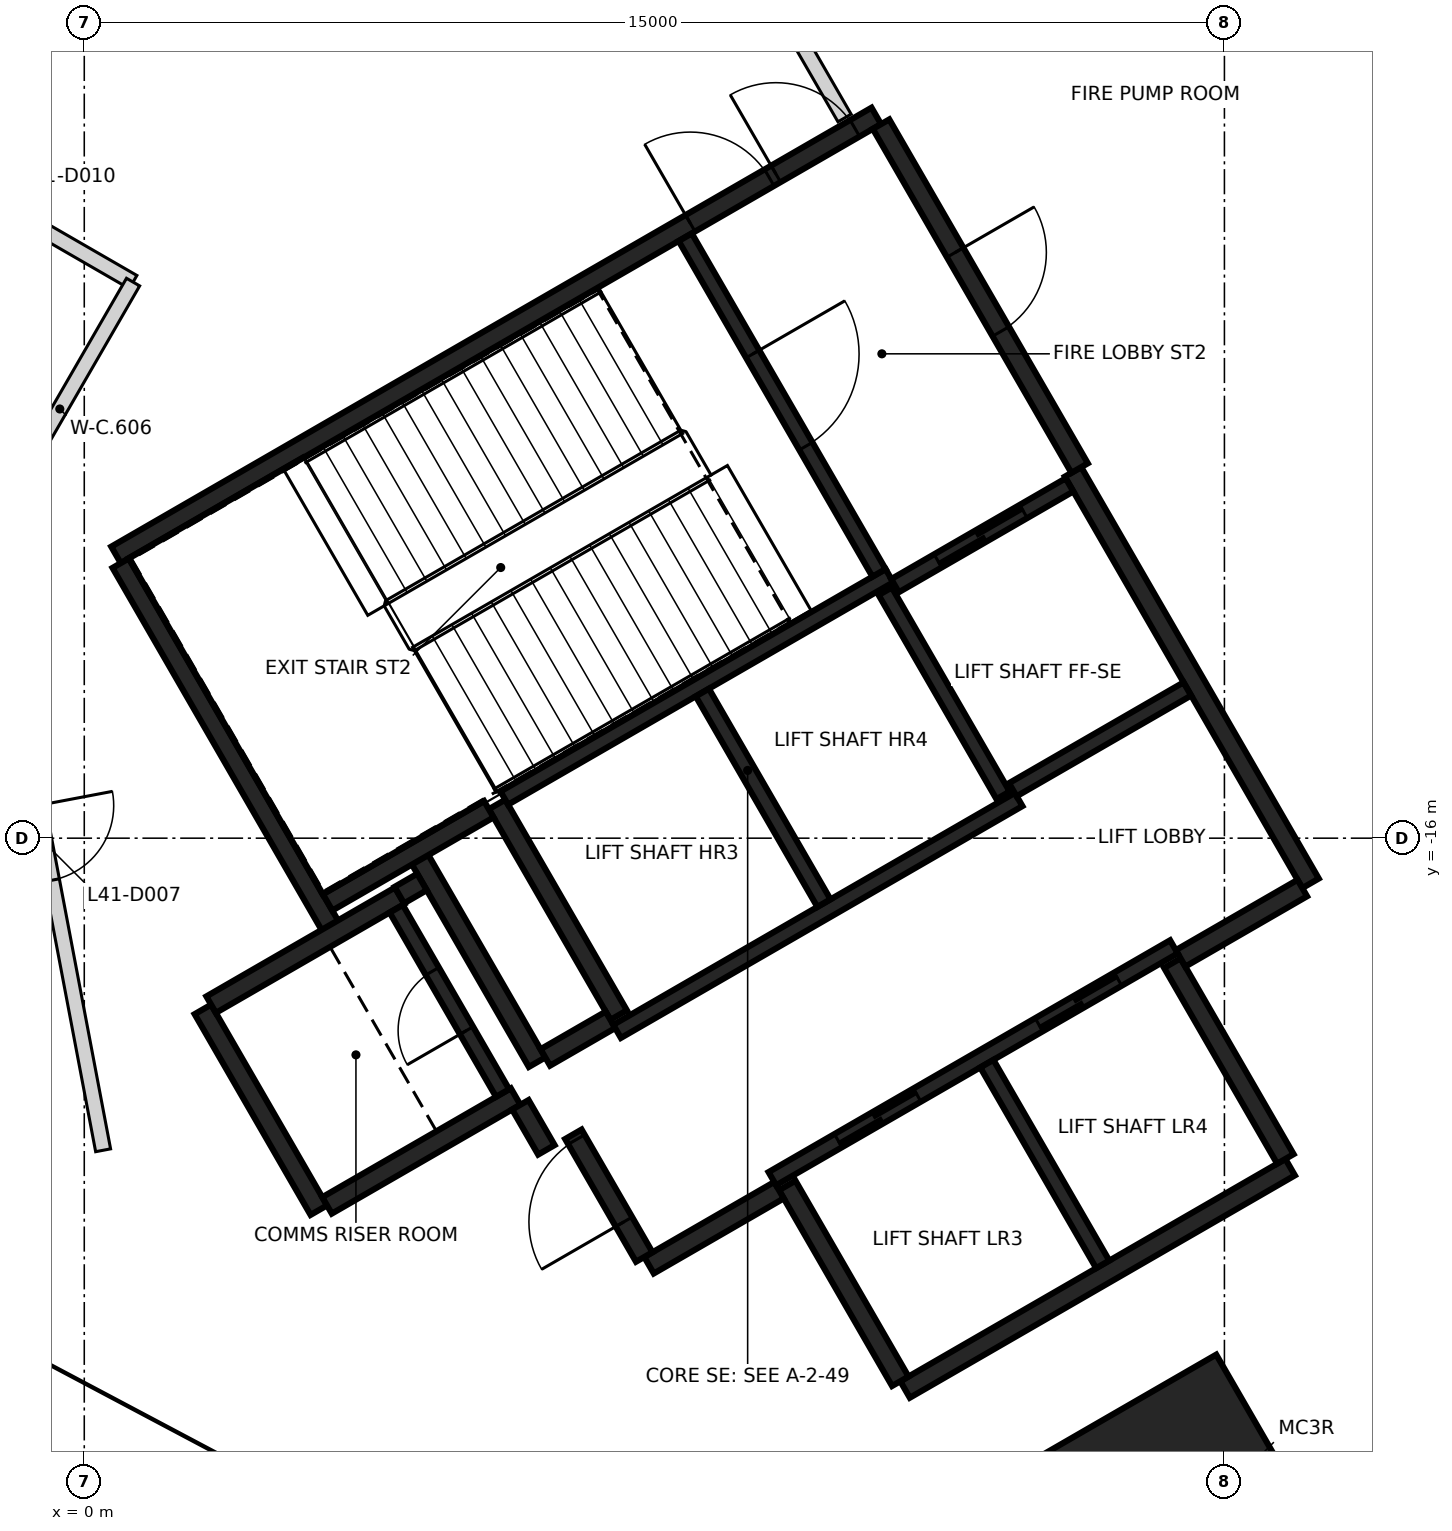
"""IFC4 building model, lengths in metres.
Left out: names, types, materials, properties, quantities, classifications, styles, units other than length and angle.
Written with IfcOpenShell. Run it as: python <this file> out.ifc"""

import sys

from ifc_helpers import new_model, si_unit, direction, frame, frame_2d, origin, origin_2d, place, context, subcontext, project, spatial, rectangle, extrude, element, fill, save


model = new_model("IFC4")
c1 = context("Model", 3, precision=1e-05, world=origin(), true_north=direction((0.0, 1.0)))
c2 = subcontext(c1, "Body", "Model", "MODEL_VIEW")
j1 = project(units=[si_unit("LENGTHUNIT", "METRE"), si_unit("PLANEANGLEUNIT", "RADIAN")], contexts=[c1])
p1 = place(None, origin())
s1 = spatial("IfcSite", under=j1, at=p1, CompositionType="ELEMENT")
p2 = place(p1, origin())
s2 = spatial("IfcBuilding", under=s1, at=p2, CompositionType="ELEMENT")
p3 = place(p2, frame((0.0, 0.0, 164.8)))
s3 = spatial("IfcBuildingStorey", under=s2, at=p3, CompositionType="ELEMENT", Elevation=164.8)
p4 = place(p3, frame((14.493, -25.103, -0.4), z_axis=(0.0, 0.0, 1.0), x_axis=(-0.5, 0.866025403784, 0.0)))
e1 = element("IfcColumn", 1, at=p4, inside=s3, PredefinedType="COLUMN", context=c2, shape_type="SweptSolid", body=[
    extrude(rectangle(XDim=3.6, YDim=3.0, at=origin_2d()), origin(), (0.0, 0.0, 1.0), 4.85),
])
p5 = place(p3, frame((0.417, -12.273, 0.0), z_axis=(0.0, 0.0, 1.0), x_axis=(0.866021906294, 0.500006057782, 0.0)))
e2 = element("IfcWall", 2, at=p5, inside=s3, PredefinedType="SHEAR", context=c2, shape_type="SweptSolid", body=[
    extrude(rectangle(XDim=11.55, YDim=0.25, at=frame_2d((5.775, 0.0))), origin(), (0.0, 0.0, 1.0), 4.45),
])
p6 = place(p5, frame((10.025, 0.0, 0.0)))
e3 = element("IfcOpeningElement", 3, at=p6, cuts=e2, PredefinedType="OPENING", context=c2, shape_type="SweptSolid", body=[
    extrude(rectangle(XDim=1.2, YDim=2.1, at=frame_2d((0.6, 1.05))), frame((0.0, 0.135, 0.0), z_axis=(0.0, -1.0, 0.0), x_axis=(1.0, 0.0, 0.0)), (0.0, 0.0, 1.0), 0.27),
])
p7 = place(p5, frame((8.725, 0.0, 0.0)))
e4 = element("IfcOpeningElement", 4, at=p7, cuts=e2, PredefinedType="OPENING", context=c2, shape_type="SweptSolid", body=[
    extrude(rectangle(XDim=1.2, YDim=2.1, at=frame_2d((0.6, 1.05))), frame((0.0, 0.135, 0.0), z_axis=(0.0, -1.0, 0.0), x_axis=(1.0, 0.0, 0.0)), (0.0, 0.0, 1.0), 0.27),
])
p8 = place(p3, frame((13.008, -11.181, 0.0), z_axis=(0.0, 0.0, 1.0), x_axis=(0.500004234368, -0.866022959057, 0.0)))
e5 = element("IfcWall", 5, at=p8, inside=s3, PredefinedType="SHEAR", context=c2, shape_type="SweptSolid", body=[
    extrude(rectangle(XDim=6.25, YDim=0.25, at=frame_2d((3.125, 0.0))), origin(), (0.0, 0.0, 1.0), 4.45),
])
p9 = place(p3, frame((15.865, -20.328, 0.0), z_axis=(0.0, 0.0, 1.0), x_axis=(-0.86602852612, -0.499994591916, 0.0)))
e6 = element("IfcWall", 6, at=p9, inside=s3, PredefinedType="SHEAR", context=c2, shape_type="SweptSolid", body=[
    extrude(rectangle(XDim=5.85, YDim=0.25, at=frame_2d((2.925, 0.0))), origin(), (0.0, 0.0, 1.0), 4.45),
])
p10 = place(p3, frame((3.235, -17.153, 0.0), z_axis=(0.0, 0.0, 1.0), x_axis=(-0.500008851346, 0.866020293397, 0.0)))
e7 = element("IfcWall", 7, at=p10, inside=s3, PredefinedType="SHEAR", context=c2, shape_type="SweptSolid", body=[
    extrude(rectangle(XDim=5.51, YDim=0.25, at=frame_2d((2.755, 0.0))), origin(), (0.0, 0.0, 1.0), 4.45),
])
p11 = place(p3, frame((10.483, -6.606, 0.0), z_axis=(0.0, 0.0, 1.0), x_axis=(0.49999885962, -0.866026062182, 0.0)))
e8 = element("IfcWall", 8, at=p11, inside=s3, PredefinedType="SHEAR", context=c2, shape_type="SweptSolid", body=[
    extrude(rectangle(XDim=5.225, YDim=0.25, at=frame_2d((2.612, 0.0))), origin(), (0.0, 0.0, 1.0), 4.45),
])
p12 = place(p11, frame((1.95, 0.0, 0.0)))
e9 = element("IfcOpeningElement", 9, at=p12, cuts=e8, PredefinedType="OPENING", context=c2, shape_type="SweptSolid", body=[
    extrude(rectangle(XDim=1.2, YDim=2.1, at=frame_2d((0.6, 1.05))), frame((0.0, 0.135, 0.0), z_axis=(0.0, -1.0, 0.0), x_axis=(1.0, 0.0, 0.0)), (0.0, 0.0, 1.0), 0.27),
])
p13 = place(p3, frame((7.031, -18.327, 0.0), z_axis=(0.0, 0.0, 1.0), x_axis=(-0.499971222258, 0.866042017984, 0.0)))
e10 = element("IfcWall", 10, at=p13, inside=s3, PredefinedType="SHEAR", context=c2, shape_type="SweptSolid", body=[
    extrude(rectangle(XDim=3.2, YDim=0.25, at=frame_2d((1.6, 0.0))), origin(), (0.0, 0.0, 1.0), 4.45),
])
for number, where, z_axis, x_axis in (
    (11, (14.315, -17.644, 0.0), (0.0, 0.0, 1.0), (0.5, -0.866, 0.0)),
    (12, (10.736, -23.145, 0.0), (0.0, 0.0, 1.0), (-0.5, 0.866, 0.0)),
):
    element("IfcWall", number, at=place(p3, frame(where, z_axis=z_axis, x_axis=x_axis)), inside=s3, PredefinedType="SHEAR", context=c2, shape_type="SweptSolid", body=[
        extrude(rectangle(XDim=2.974, YDim=0.25, at=frame_2d((1.487, 0.0))), origin(), (0.0, 0.0, 1.0), 4.45),
    ])
p14 = place(p3, frame((3.085, -20.894, 0.0), z_axis=(0.0, 0.0, 1.0), x_axis=(-0.499978833458, 0.866037623948, 0.0)))
e13 = element("IfcWall", 13, at=p14, inside=s3, PredefinedType="SHEAR", context=c2, shape_type="SweptSolid", body=[
    extrude(rectangle(XDim=3.05, YDim=0.25, at=frame_2d((1.525, 0.0))), origin(), (0.0, 0.0, 1.0), 4.45),
])
p15 = place(p3, frame((1.669, -18.19, 0.0), z_axis=(0.0, 0.0, 1.0), x_axis=(0.866042235819, 0.499970844928, 0.0)))
e14 = element("IfcWall", 14, at=p15, inside=s3, PredefinedType="SHEAR", context=c2, shape_type="SweptSolid", body=[
    extrude(rectangle(XDim=2.865, YDim=0.25, at=frame_2d((1.432, 0.0))), origin(), (0.0, 0.0, 1.0), 4.45),
])
p16 = place(p3, frame((5.675, -19.399, 0.0), z_axis=(0.0, 0.0, 1.0), x_axis=(-0.866026637627, -0.499997862916, 0.0)))
e15 = element("IfcWall", 15, at=p16, inside=s3, PredefinedType="SHEAR", context=c2, shape_type="SweptSolid", body=[
    extrude(rectangle(XDim=2.865, YDim=0.25, at=frame_2d((1.432, 0.0))), origin(), (0.0, 0.0, 1.0), 4.45),
])
p17 = place(p3, frame((4.414, -16.276, 0.0), z_axis=(0.0, 0.0, 1.0), x_axis=(0.500003324108, -0.866023484601, 0.0)))
e16 = element("IfcWall", 16, at=p17, inside=s3, PredefinedType="SHEAR", context=c2, shape_type="SweptSolid", body=[
    extrude(rectangle(XDim=3.085, YDim=0.25, at=frame_2d((1.542, 0.0))), origin(), (0.0, 0.0, 1.0), 4.45),
])
p18 = place(p3, frame((5.322, -15.619, 0.0), z_axis=(0.0, 0.0, 1.0), x_axis=(-0.866026229868, -0.499998569178, 0.0)))
e17 = element("IfcWall", 17, at=p18, inside=s3, PredefinedType="SHEAR", context=c2, shape_type="SweptSolid", body=[
    extrude(rectangle(XDim=2.449, YDim=0.25, at=frame_2d((1.225, 0.0))), origin(), (0.0, 0.0, 1.0), 4.45),
])
p19 = place(p3, frame((9.14, -20.631, 0.0), z_axis=(0.0, 0.0, 1.0), x_axis=(-0.866043531843, -0.499968599967, 0.0)))
e18 = element("IfcWall", 18, at=p19, inside=s3, PredefinedType="SHEAR", context=c2, shape_type="SweptSolid", body=[
    extrude(rectangle(XDim=1.975, YDim=0.25, at=frame_2d((0.987, 0.0))), origin(), (0.0, 0.0, 1.0), 4.45),
])
p20 = place(p3, frame((16.025, -16.656, 0.0), z_axis=(0.0, 0.0, 1.0), x_axis=(-0.866016279763, -0.500015802937, 0.0)))
e19 = element("IfcWall", 19, at=p20, inside=s3, PredefinedType="SHEAR", context=c2, shape_type="SweptSolid", body=[
    extrude(rectangle(XDim=1.849, YDim=0.25, at=frame_2d((0.925, 0.0))), origin(), (0.0, 0.0, 1.0), 4.45),
])
p21 = place(p3, frame((7.367, -21.51, 0.0), z_axis=(0.0, 0.0, 1.0), x_axis=(-0.499983108224, 0.866035156036, 0.0)))
e20 = element("IfcWall", 20, at=p21, inside=s3, PredefinedType="SHEAR", context=c2, shape_type="SweptSolid", body=[
    extrude(rectangle(XDim=1.865, YDim=0.25, at=frame_2d((0.932, 0.0))), origin(), (0.0, 0.0, 1.0), 4.45),
])
p22 = place(p21, frame((0.535, 0.0, 0.0)))
e21 = element("IfcOpeningElement", 21, at=p22, cuts=e20, PredefinedType="OPENING", context=c2, shape_type="SweptSolid", body=[
    extrude(rectangle(XDim=1.25, YDim=2.1, at=frame_2d((0.625, 1.05))), frame((0.0, 0.135, 0.0), z_axis=(0.0, -1.0, 0.0), x_axis=(1.0, 0.0, 0.0)), (0.0, 0.0, 1.0), 0.27),
])
p23 = place(p3, frame((6.065, -18.885, 0.0), z_axis=(0.0, 0.0, 1.0), x_axis=(0.866017078145, 0.500014420154, 0.0)))
e22 = element("IfcWall", 22, at=p23, inside=s3, PredefinedType="SHEAR", context=c2, shape_type="SweptSolid", body=[
    extrude(rectangle(XDim=0.989, YDim=0.25, at=frame_2d((0.495, 0.0))), origin(), (0.0, 0.0, 1.0), 4.45),
])
p24 = place(p3, frame((6.08, -20.1, 0.0), z_axis=(0.0, 0.0, 1.0), x_axis=(-0.500051773299, 0.865995510393, 0.0)))
e23 = element("IfcWall", 23, at=p24, inside=s3, PredefinedType="SHEAR", context=c2, shape_type="SweptSolid", body=[
    extrude(rectangle(XDim=0.685, YDim=0.25, at=frame_2d((0.342, 0.0))), origin(), (0.0, 0.0, 1.0), 4.45),
])
p25 = place(p3, frame((4.145, -16.749, 0.0), z_axis=(0.0, 0.0, 1.0), x_axis=(0.866185586049, 0.49972245349, 0.0)))
e24 = element("IfcWall", 24, at=p25, inside=s3, PredefinedType="SHEAR", context=c2, shape_type="SweptSolid", body=[
    extrude(rectangle(XDim=0.344, YDim=0.25, at=frame_2d((0.172, 0.0))), origin(), (0.0, 0.0, 1.0), 4.45),
])
p26 = place(p3, frame((9.052, -20.48, 0.0), z_axis=(0.0, 0.0, 1.0), x_axis=(0.866030299012, 0.499991521122, 0.0)))
e25 = element("IfcWall", 25, at=p26, inside=s3, PredefinedType="SHEAR", context=c2, shape_type="SweptSolid", body=[
    extrude(rectangle(XDim=6.1, YDim=0.2, at=frame_2d((3.05, 0.0))), origin(), (0.0, 0.0, 1.0), 4.45),
])
p27 = place(p26, frame((1.0, 0.0, 0.0)))
e26 = element("IfcOpeningElement", 26, at=p27, cuts=e25, PredefinedType="OPENING", context=c2, shape_type="SweptSolid", body=[
    extrude(rectangle(XDim=1.2, YDim=2.1, at=frame_2d((0.6, 1.05))), frame((0.0, 0.11, 0.0), z_axis=(0.0, -1.0, 0.0), x_axis=(1.0, 0.0, 0.0)), (0.0, 0.0, 1.0), 0.22),
])
p28 = place(p26, frame((4.05, 0.0, 0.0)))
e27 = element("IfcOpeningElement", 27, at=p28, cuts=e25, PredefinedType="OPENING", context=c2, shape_type="SweptSolid", body=[
    extrude(rectangle(XDim=1.2, YDim=2.1, at=frame_2d((0.6, 1.05))), frame((0.0, 0.11, 0.0), z_axis=(0.0, -1.0, 0.0), x_axis=(1.0, 0.0, 0.0)), (0.0, 0.0, 1.0), 0.22),
])
p29 = place(p3, frame((5.526, -15.472, 0.0), z_axis=(0.0, 0.0, 1.0), x_axis=(0.866041752167, 0.499971682701, 0.0)))
e28 = element("IfcWall", 28, at=p29, inside=s3, PredefinedType="SHEAR", context=c2, shape_type="SweptSolid", body=[
    extrude(rectangle(XDim=5.851, YDim=0.2, at=frame_2d((2.925, 0.0))), origin(), (0.0, 0.0, 1.0), 4.45),
])
p30 = place(p3, frame((12.293, -15.491, 0.0), z_axis=(0.0, 0.0, 1.0), x_axis=(-0.866030299012, -0.499991521122, 0.0)))
e29 = element("IfcWall", 29, at=p30, inside=s3, PredefinedType="SHEAR", context=c2, shape_type="SweptSolid", body=[
    extrude(rectangle(XDim=6.1, YDim=0.2, at=frame_2d((3.05, 0.0))), origin(), (0.0, 0.0, 1.0), 4.45),
])
p31 = place(p3, frame((7.906, -8.094, 0.0), z_axis=(0.0, 0.0, 1.0), x_axis=(0.500027839223, -0.866009330205, 0.0)))
e30 = element("IfcWall", 30, at=p31, inside=s3, PredefinedType="SHEAR", context=c2, shape_type="SweptSolid", body=[
    extrude(rectangle(XDim=5.098, YDim=0.2, at=frame_2d((2.549, 0.0))), origin(), (0.0, 0.0, 1.0), 4.45),
])
p32 = place(p31, frame((1.774, 0.0, 0.0)))
e31 = element("IfcOpeningElement", 31, at=p32, cuts=e30, PredefinedType="OPENING", context=c2, shape_type="SweptSolid", body=[
    extrude(rectangle(XDim=1.4, YDim=2.1, at=frame_2d((0.7, 1.05))), frame((0.0, 0.11, 0.0), z_axis=(0.0, -1.0, 0.0), x_axis=(1.0, 0.0, 0.0)), (0.0, 0.0, 1.0), 0.22),
])
p33 = place(p3, frame((8.132, -14.084, 0.0), z_axis=(0.0, 0.0, 1.0), x_axis=(0.499997778408, -0.866026686418, 0.0)))
e32 = element("IfcWall", 32, at=p33, inside=s3, PredefinedType="SHEAR", context=c2, shape_type="SweptSolid", body=[
    extrude(rectangle(XDim=3.198, YDim=0.2, at=frame_2d((1.599, 0.0))), origin(), (0.0, 0.0, 1.0), 4.45),
])
p34 = place(p3, frame((11.875, -18.967, 0.0), z_axis=(0.0, 0.0, 1.0), x_axis=(0.49998131003, -0.866036194175, 0.0)))
e33 = element("IfcWall", 33, at=p34, inside=s3, PredefinedType="SHEAR", context=c2, shape_type="SweptSolid", body=[
    extrude(rectangle(XDim=3.048, YDim=0.2, at=frame_2d((1.524, 0.0))), origin(), (0.0, 0.0, 1.0), 4.45),
])
p35 = place(p3, frame((5.503, -19.352, 0.0), z_axis=(0.0, 0.0, 1.0), x_axis=(-0.499986818241, 0.866033014143, 0.0)))
e34 = element("IfcWall", 34, at=p35, inside=s3, PredefinedType="SHEAR", context=c2, shape_type="SweptSolid", body=[
    extrude(rectangle(XDim=2.798, YDim=0.2, at=frame_2d((1.399, 0.0))), origin(), (0.0, 0.0, 1.0), 4.45),
])
p36 = place(p35, frame((0.949, 0.0, 0.0)))
e35 = element("IfcOpeningElement", 35, at=p36, cuts=e34, PredefinedType="OPENING", context=c2, shape_type="SweptSolid", body=[
    extrude(rectangle(XDim=0.9, YDim=2.1, at=frame_2d((0.45, 1.05))), frame((0.0, 0.11, 0.0), z_axis=(0.0, -1.0, 0.0), x_axis=(1.0, 0.0, 0.0)), (0.0, 0.0, 1.0), 0.22),
])
p37 = place(p3, frame((12.088, -15.437, 0.0), z_axis=(0.0, 0.0, 1.0), x_axis=(-0.500026960575, 0.86600983753, 0.0)))
e36 = element("IfcWall", 36, at=p37, inside=s3, PredefinedType="SHEAR", context=c2, shape_type="SweptSolid", body=[
    extrude(rectangle(XDim=3.1, YDim=0.2, at=frame_2d((1.55, 0.0))), origin(), (0.0, 0.0, 1.0), 4.45),
])
p38 = place(p3, frame((10.666, -12.678, 0.0), z_axis=(0.0, 0.0, 1.0), x_axis=(0.866018407898, 0.500012117035, 0.0)))
e37 = element("IfcWall", 37, at=p38, inside=s3, PredefinedType="SHEAR", context=c2, shape_type="SweptSolid", body=[
    extrude(rectangle(XDim=2.651, YDim=0.2, at=frame_2d((1.325, 0.0))), origin(), (0.0, 0.0, 1.0), 4.45),
])
p39 = place(p38, frame((0.652, 0.0, 0.0)))
e38 = element("IfcOpeningElement", 38, at=p39, cuts=e37, PredefinedType="OPENING", context=c2, shape_type="SweptSolid", body=[
    extrude(rectangle(XDim=1.3, YDim=2.1, at=frame_2d((0.65, 1.05))), frame((0.0, 0.11, 0.0), z_axis=(0.0, -1.0, 0.0), x_axis=(1.0, 0.0, 0.0)), (0.0, 0.0, 1.0), 0.22),
])
p40 = place(p3, frame((14.512, -14.037, 0.0), z_axis=(0.0, 0.0, 1.0), x_axis=(-0.866018407898, -0.500012117035, 0.0)))
e39 = element("IfcWall", 39, at=p40, inside=s3, PredefinedType="SHEAR", context=c2, shape_type="SweptSolid", body=[
    extrude(rectangle(XDim=2.651, YDim=0.2, at=frame_2d((1.325, 0.0))), origin(), (0.0, 0.0, 1.0), 4.45),
])
p41 = place(p3, frame((-7.058, -4.239, 0.0), z_axis=(0.0, 0.0, 1.0), x_axis=(0.86609917177, -0.499872208329, 0.0)))
e40 = element("IfcWall", 40, at=p41, inside=s3, PredefinedType="PARTITIONING", context=c2, shape_type="SweptSolid", body=[
    extrude(rectangle(XDim=8.891, YDim=0.2, at=frame_2d((4.445, 0.0))), origin(), (0.0, 0.0, 1.0), 4.45),
])
p42 = place(p41, frame((0.674, 0.0, 0.0)))
e41 = element("IfcOpeningElement", 41, at=p42, cuts=e40, PredefinedType="OPENING", context=c2, shape_type="SweptSolid", body=[
    extrude(rectangle(XDim=2.0, YDim=2.1, at=frame_2d((1.0, 1.05))), frame((0.0, 0.11, 0.0), z_axis=(0.0, -1.0, 0.0), x_axis=(1.0, 0.0, 0.0)), (0.0, 0.0, 1.0), 0.22),
])
p43 = place(p41, frame((5.52, 0.0, 0.0)))
e42 = element("IfcOpeningElement", 42, at=p43, cuts=e40, PredefinedType="OPENING", context=c2, shape_type="SweptSolid", body=[
    extrude(rectangle(XDim=1.2, YDim=2.1, at=frame_2d((0.6, 1.05))), frame((0.0, 0.11, 0.0), z_axis=(0.0, -1.0, 0.0), x_axis=(1.0, 0.0, 0.0)), (0.0, 0.0, 1.0), 0.22),
])
p44 = place(p3, frame((-1.286, -12.023, 0.0), z_axis=(0.0, 0.0, 1.0), x_axis=(0.186445263773, -0.98246534983, 0.0)))
e43 = element("IfcWall", 43, at=p44, inside=s3, PredefinedType="PARTITIONING", context=c2, shape_type="SweptSolid", body=[
    extrude(rectangle(XDim=8.227, YDim=0.2, at=frame_2d((4.114, 0.0))), origin(), (0.0, 0.0, 1.0), 4.45),
])
p45 = place(p44, frame((3.611, 0.0, 0.0)))
e44 = element("IfcOpeningElement", 44, at=p45, cuts=e43, PredefinedType="OPENING", context=c2, shape_type="SweptSolid", body=[
    extrude(rectangle(XDim=1.0, YDim=2.1, at=frame_2d((0.5, 1.05))), frame((0.0, 0.11, 0.0), z_axis=(0.0, -1.0, 0.0), x_axis=(1.0, 0.0, 0.0)), (0.0, 0.0, 1.0), 0.22),
])
p46 = place(p3, frame((-1.286, -12.023, 0.0), z_axis=(0.0, 0.0, 1.0), x_axis=(0.50005498091, 0.865993658214, 0.0)))
e45 = element("IfcWall", 45, at=p46, inside=s3, PredefinedType="PARTITIONING", context=c2, shape_type="SweptSolid", body=[
    extrude(rectangle(XDim=3.855, YDim=0.2, at=frame_2d((1.928, 0.0))), origin(), (0.0, 0.0, 1.0), 4.45),
])
p47 = place(p3, frame((8.961, -4.721, 0.0), z_axis=(0.0, 0.0, 1.0), x_axis=(0.499806992981, -0.866136807766, 0.0)))
e46 = element("IfcWall", 46, at=p47, inside=s3, PredefinedType="PARTITIONING", context=c2, shape_type="SweptSolid", body=[
    extrude(rectangle(XDim=2.083, YDim=0.2, at=frame_2d((1.042, 0.0))), origin(), (0.0, 0.0, 1.0), 4.45),
])
p48 = place(p39, origin())
e47 = element("IfcDoor", 47, at=p48, inside=s3, OperationType="SLIDING_TO_LEFT", PredefinedType="DOOR", context=c2, shape_type="SweptSolid", body=[
    extrude(rectangle(XDim=1.3, YDim=2.1, at=frame_2d((0.65, 1.05))), frame((0.0, 0.025, 0.0), z_axis=(0.0, -1.0, 0.0), x_axis=(1.0, 0.0, 0.0)), (0.0, 0.0, 1.0), 0.05),
])
fill(e38, e47)
p49 = place(p27, origin())
e48 = element("IfcDoor", 48, at=p49, inside=s3, OperationType="DOUBLE_DOOR_SLIDING", PredefinedType="DOOR", context=c2, shape_type="SweptSolid", body=[
    extrude(rectangle(XDim=1.2, YDim=2.1, at=frame_2d((0.6, 1.05))), frame((0.0, 0.025, 0.0), z_axis=(0.0, -1.0, 0.0), x_axis=(1.0, 0.0, 0.0)), (0.0, 0.0, 1.0), 0.05),
])
fill(e26, e48)
p50 = place(p28, origin())
e49 = element("IfcDoor", 49, at=p50, inside=s3, OperationType="DOUBLE_DOOR_SLIDING", PredefinedType="DOOR", context=c2, shape_type="SweptSolid", body=[
    extrude(rectangle(XDim=1.2, YDim=2.1, at=frame_2d((0.6, 1.05))), frame((0.0, 0.025, 0.0), z_axis=(0.0, -1.0, 0.0), x_axis=(1.0, 0.0, 0.0)), (0.0, 0.0, 1.0), 0.05),
])
fill(e27, e49)
p51 = place(p22, origin())
e50 = element("IfcDoor", 50, at=p51, inside=s3, OperationType="SINGLE_SWING_LEFT", PredefinedType="DOOR", context=c2, shape_type="SweptSolid", body=[
    extrude(rectangle(XDim=1.25, YDim=2.1, at=frame_2d((0.625, 1.05))), frame((0.0, 0.025, 0.0), z_axis=(0.0, -1.0, 0.0), x_axis=(1.0, 0.0, 0.0)), (0.0, 0.0, 1.0), 0.05),
])
fill(e21, e50)
p52 = place(p6, origin())
e51 = element("IfcDoor", 51, at=p52, inside=s3, OperationType="SINGLE_SWING_LEFT", PredefinedType="DOOR", context=c2, shape_type="SweptSolid", body=[
    extrude(rectangle(XDim=1.2, YDim=2.1, at=frame_2d((0.6, 1.05))), frame((0.0, 0.025, 0.0), z_axis=(0.0, -1.0, 0.0), x_axis=(1.0, 0.0, 0.0)), (0.0, 0.0, 1.0), 0.05),
])
fill(e3, e51)
p53 = place(p7, origin())
e52 = element("IfcDoor", 52, at=p53, inside=s3, OperationType="SINGLE_SWING_RIGHT", PredefinedType="DOOR", context=c2, shape_type="SweptSolid", body=[
    extrude(rectangle(XDim=1.2, YDim=2.1, at=frame_2d((0.6, 1.05))), frame((0.0, 0.025, 0.0), z_axis=(0.0, -1.0, 0.0), x_axis=(1.0, 0.0, 0.0)), (0.0, 0.0, 1.0), 0.05),
])
fill(e4, e52)
p54 = place(p32, origin())
e53 = element("IfcDoor", 53, at=p54, inside=s3, OperationType="SINGLE_SWING_LEFT", PredefinedType="DOOR", context=c2, shape_type="SweptSolid", body=[
    extrude(rectangle(XDim=1.4, YDim=2.1, at=frame_2d((0.7, 1.05))), frame((0.0, 0.025, 0.0), z_axis=(0.0, -1.0, 0.0), x_axis=(1.0, 0.0, 0.0)), (0.0, 0.0, 1.0), 0.05),
])
fill(e31, e53)
p55 = place(p36, origin())
e54 = element("IfcDoor", 54, at=p55, inside=s3, OperationType="SINGLE_SWING_RIGHT", PredefinedType="DOOR", context=c2, shape_type="SweptSolid", body=[
    extrude(rectangle(XDim=0.9, YDim=2.1, at=frame_2d((0.45, 1.05))), frame((0.0, 0.025, 0.0), z_axis=(0.0, -1.0, 0.0), x_axis=(1.0, 0.0, 0.0)), (0.0, 0.0, 1.0), 0.05),
])
fill(e35, e54)
p56 = place(p12, origin())
e55 = element("IfcDoor", 55, at=p56, inside=s3, OperationType="SINGLE_SWING_RIGHT", PredefinedType="DOOR", context=c2, shape_type="SweptSolid", body=[
    extrude(rectangle(XDim=1.2, YDim=2.1, at=frame_2d((0.6, 1.05))), frame((0.0, 0.025, 0.0), z_axis=(0.0, -1.0, 0.0), x_axis=(1.0, 0.0, 0.0)), (0.0, 0.0, 1.0), 0.05),
])
fill(e9, e55)
p57 = place(p45, frame((1.0, 0.0, 0.0), z_axis=(0.0, 0.0, 1.0), x_axis=(-1.0, 0.0, 0.0)))
e56 = element("IfcDoor", 56, at=p57, inside=s3, OperationType="SINGLE_SWING_LEFT", PredefinedType="DOOR", context=c2, shape_type="SweptSolid", body=[
    extrude(rectangle(XDim=1.0, YDim=2.1, at=frame_2d((0.5, 1.05))), frame((0.0, 0.025, 0.0), z_axis=(0.0, -1.0, 0.0), x_axis=(1.0, 0.0, 0.0)), (0.0, 0.0, 1.0), 0.05),
])
fill(e44, e56)
save(model, sys.argv[1])
